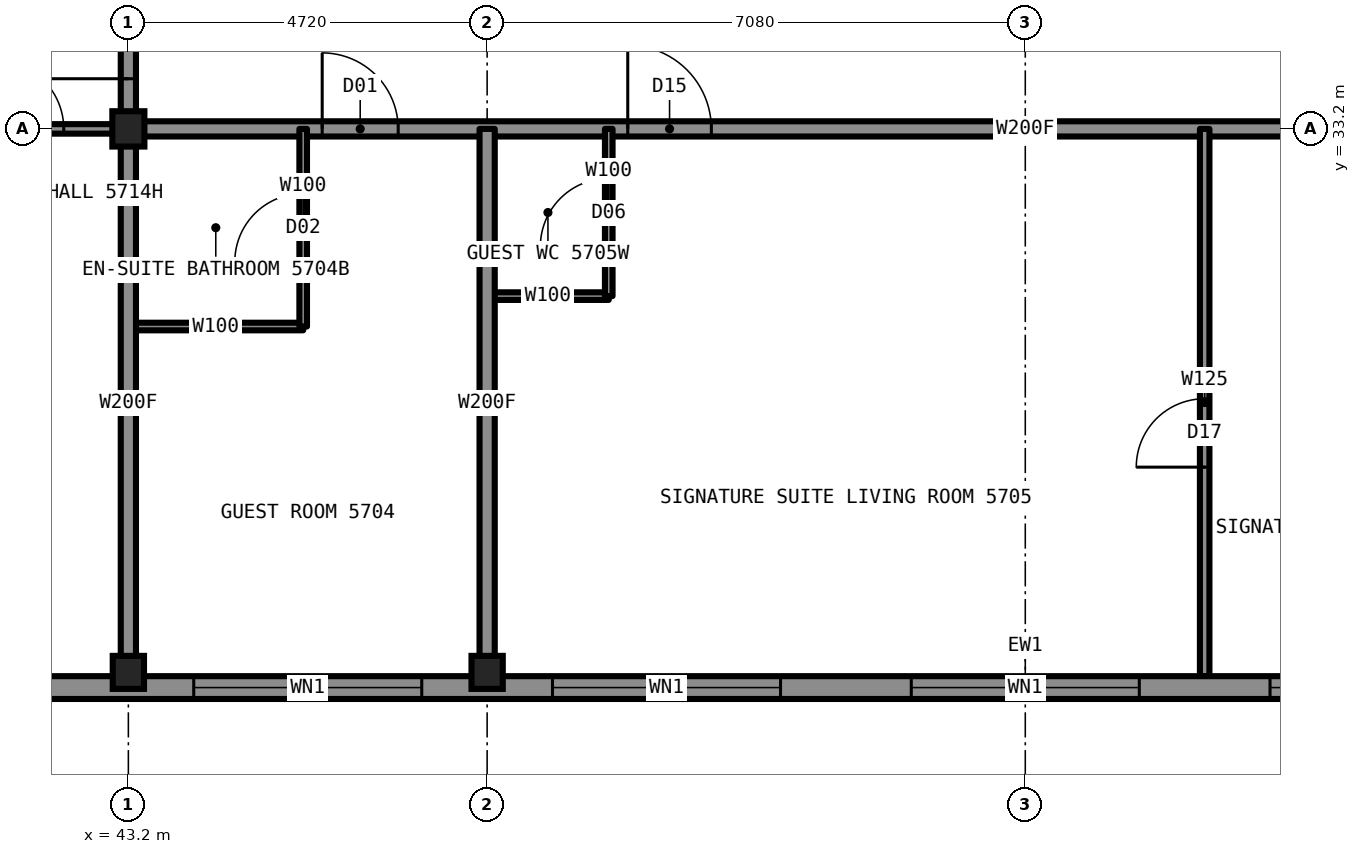
"""IFC4 building model, lengths in metres.
Left out: names, types, materials, properties, quantities, classifications, styles, units other than length and angle.
Written with IfcOpenShell. Run it as: python <this file> out.ifc"""

import sys

from ifc_helpers import new_model, si_unit, direction, frame, frame_2d, origin, origin_2d, place, context, subcontext, project, spatial, rectangle, i_section, extrude, element, fill, save


model = new_model("IFC4")
c1 = context("Model", 3, precision=1e-05, world=origin(), true_north=direction((0.0, 1.0)))
c2 = subcontext(c1, "Body", "Model", "MODEL_VIEW")
j1 = project(units=[si_unit("LENGTHUNIT", "METRE"), si_unit("PLANEANGLEUNIT", "RADIAN")], contexts=[c1])
p1 = place(None, origin())
s1 = spatial("IfcSite", under=j1, at=p1, CompositionType="ELEMENT")
p2 = place(p1, origin())
s2 = spatial("IfcBuilding", under=s1, at=p2, CompositionType="ELEMENT")
p3 = place(p2, frame((0.0, 0.0, 203.8)))
s3 = spatial("IfcBuildingStorey", under=s2, at=p3, CompositionType="ELEMENT", Elevation=203.8)
for number, where, z_axis, x_axis in (
    (1, (43.2, 26.05, 0.0), (0.0, 0.0, 1.0), (1.0, 0.0, 0.0)),
    (2, (47.92, 26.05, 0.0), (0.0, 0.0, 1.0), (1.0, 0.0, 0.0)),
):
    element("IfcColumn", number, at=place(p3, frame(where, z_axis=z_axis, x_axis=x_axis)), inside=s3, PredefinedType="COLUMN", context=c2, shape_type="SweptSolid", body=[
        extrude(i_section(OverallWidth=0.411, OverallDepth=0.434, WebThickness=0.036, FlangeThickness=0.057, at=origin_2d()), origin(), (0.0, 0.0, 1.0), 3.5),
    ])
p4 = place(p3, frame((43.2, 33.2, 0.0), z_axis=(0.0, 0.0, 1.0), x_axis=(1.0, 0.0, 0.0)))
e3 = element("IfcColumn", 3, at=p4, inside=s3, PredefinedType="COLUMN", context=c2, shape_type="SweptSolid", body=[
    extrude(i_section(OverallWidth=0.422, OverallDepth=0.465, WebThickness=0.045, FlangeThickness=0.073, at=origin_2d()), origin(), (0.0, 0.0, 1.0), 3.5),
])
p5 = place(p3, frame((43.2, 33.2, 0.0), z_axis=(0.0, 0.0, 1.0), x_axis=(1.0, 0.0, 0.0)))
e4 = element("IfcWall", 4, at=p5, inside=s3, PredefinedType="PARTITIONING", context=c2, shape_type="SweptSolid", body=[
    extrude(rectangle(XDim=23.6, YDim=0.2, at=frame_2d((11.8, 0.0))), origin(), (0.0, 0.0, 1.0), 3.33),
])
p6 = place(p5, frame((2.55, 0.0, 0.0)))
e5 = element("IfcOpeningElement", 5, at=p6, cuts=e4, PredefinedType="OPENING", context=c2, shape_type="SweptSolid", body=[
    extrude(rectangle(XDim=1.0, YDim=2.2, at=frame_2d((0.5, 1.1))), frame((0.0, 0.11, 0.0), z_axis=(0.0, -1.0, 0.0), x_axis=(1.0, 0.0, 0.0)), (0.0, 0.0, 1.0), 0.22),
])
p7 = place(p5, frame((6.57, 0.0, 0.0)))
e6 = element("IfcOpeningElement", 6, at=p7, cuts=e4, PredefinedType="OPENING", context=c2, shape_type="SweptSolid", body=[
    extrude(rectangle(XDim=1.1, YDim=2.2, at=frame_2d((0.55, 1.1))), frame((0.0, 0.11, 0.0), z_axis=(0.0, -1.0, 0.0), x_axis=(1.0, 0.0, 0.0)), (0.0, 0.0, 1.0), 0.22),
])
p8 = place(p5, frame((21.14, 0.0, 0.0)))
e7 = element("IfcOpeningElement", 7, at=p8, cuts=e4, PredefinedType="OPENING", context=c2, shape_type="SweptSolid", body=[
    extrude(rectangle(XDim=1.0, YDim=2.2, at=frame_2d((0.5, 1.1))), frame((0.0, 0.11, 0.0), z_axis=(0.0, -1.0, 0.0), x_axis=(1.0, 0.0, 0.0)), (0.0, 0.0, 1.0), 0.22),
])
p9 = place(p3, frame((36.0, 33.2, 0.0), z_axis=(0.0, 0.0, 1.0), x_axis=(1.0, 0.0, 0.0)))
e8 = element("IfcWall", 8, at=p9, inside=s3, PredefinedType="PARTITIONING", context=c2, shape_type="SweptSolid", body=[
    extrude(rectangle(XDim=7.2, YDim=0.125, at=frame_2d((3.6, 0.0))), origin(), (0.0, 0.0, 1.0), 2.573),
])
p10 = place(p9, frame((5.45, 0.0, 0.0)))
e9 = element("IfcOpeningElement", 9, at=p10, cuts=e8, PredefinedType="OPENING", context=c2, shape_type="SweptSolid", body=[
    extrude(rectangle(XDim=0.9, YDim=2.2, at=frame_2d((0.45, 1.1))), frame((0.0, 0.073, 0.0), z_axis=(0.0, -1.0, 0.0), x_axis=(1.0, 0.0, 0.0)), (0.0, 0.0, 1.0), 0.145),
])
p11 = place(p3, frame((47.92, 31.0, 0.0), z_axis=(0.0, 0.0, 1.0), x_axis=(1.0, 0.0, 0.0)))
e10 = element("IfcWall", 10, at=p11, inside=s3, PredefinedType="PARTITIONING", context=c2, shape_type="SweptSolid", body=[
    extrude(rectangle(XDim=1.6, YDim=0.1, at=frame_2d((0.8, 0.0))), origin(), (0.0, 0.0, 1.0), 3.33),
])
p12 = place(p3, frame((43.2, 30.6, 0.0), z_axis=(0.0, 0.0, 1.0), x_axis=(1.0, 0.0, 0.0)))
e11 = element("IfcWall", 11, at=p12, inside=s3, PredefinedType="PARTITIONING", context=c2, shape_type="SweptSolid", body=[
    extrude(rectangle(XDim=2.3, YDim=0.1, at=frame_2d((1.15, 0.0))), origin(), (0.0, 0.0, 1.0), 3.33),
])
p13 = place(p3, frame((43.2, 33.2, 0.0), z_axis=(0.0, 0.0, 1.0), x_axis=(0.0, 1.0, 0.0)))
e12 = element("IfcWall", 12, at=p13, inside=s3, PredefinedType="PARTITIONING", context=c2, shape_type="SweptSolid", body=[
    extrude(rectangle(XDim=23.58, YDim=0.2, at=frame_2d((11.79, 0.0))), origin(), (0.0, 0.0, 1.0), 3.33),
])
p14 = place(p13, frame((7.72, 0.0, 0.0)))
e13 = element("IfcOpeningElement", 13, at=p14, cuts=e12, PredefinedType="OPENING", context=c2, shape_type="SweptSolid", body=[
    extrude(rectangle(XDim=1.0, YDim=2.2, at=frame_2d((0.5, 1.1))), frame((0.0, 0.11, 0.0), z_axis=(0.0, -1.0, 0.0), x_axis=(1.0, 0.0, 0.0)), (0.0, 0.0, 1.0), 0.22),
])
p15 = place(p13, frame((17.31, 0.0, 0.0)))
e14 = element("IfcOpeningElement", 14, at=p15, cuts=e12, PredefinedType="OPENING", context=c2, shape_type="SweptSolid", body=[
    extrude(rectangle(XDim=1.0, YDim=2.2, at=frame_2d((0.5, 1.1))), frame((0.0, 0.11, 0.0), z_axis=(0.0, -1.0, 0.0), x_axis=(1.0, 0.0, 0.0)), (0.0, 0.0, 1.0), 0.22),
])
p16 = place(p13, frame((22.05, 0.0, 0.0)))
e15 = element("IfcOpeningElement", 15, at=p16, cuts=e12, PredefinedType="OPENING", context=c2, shape_type="SweptSolid", body=[
    extrude(rectangle(XDim=1.1, YDim=2.2, at=frame_2d((0.55, 1.1))), frame((0.0, 0.11, 0.0), z_axis=(0.0, -1.0, 0.0), x_axis=(1.0, 0.0, 0.0)), (0.0, 0.0, 1.0), 0.22),
])
p17 = place(p13, frame((0.66, 0.0, 0.0)))
e16 = element("IfcOpeningElement", 16, at=p17, cuts=e12, PredefinedType="OPENING", context=c2, shape_type="SweptSolid", body=[
    extrude(rectangle(XDim=1.1, YDim=2.2, at=frame_2d((0.55, 1.1))), frame((0.0, 0.11, 0.0), z_axis=(0.0, -1.0, 0.0), x_axis=(1.0, 0.0, 0.0)), (0.0, 0.0, 1.0), 0.22),
])
p18 = place(p3, frame((43.2, 26.0, 0.0), z_axis=(0.0, 0.0, 1.0), x_axis=(0.0, 1.0, 0.0)))
e17 = element("IfcWall", 17, at=p18, inside=s3, PredefinedType="PARTITIONING", context=c2, shape_type="SweptSolid", body=[
    extrude(rectangle(XDim=7.2, YDim=0.2, at=frame_2d((3.6, 0.0))), origin(), (0.0, 0.0, 1.0), 2.573),
])
p19 = place(p3, frame((49.52, 31.0, 0.0), z_axis=(0.0, 0.0, 1.0), x_axis=(0.0, 1.0, 0.0)))
e18 = element("IfcWall", 18, at=p19, inside=s3, PredefinedType="PARTITIONING", context=c2, shape_type="SweptSolid", body=[
    extrude(rectangle(XDim=2.2, YDim=0.1, at=frame_2d((1.1, 0.0))), origin(), (0.0, 0.0, 1.0), 3.33),
])
p20 = place(p19, frame((0.65, 0.0, 0.0)))
e19 = element("IfcOpeningElement", 19, at=p20, cuts=e18, PredefinedType="OPENING", context=c2, shape_type="SweptSolid", body=[
    extrude(rectangle(XDim=0.9, YDim=2.1, at=frame_2d((0.45, 1.05))), frame((0.0, 0.06, 0.0), z_axis=(0.0, -1.0, 0.0), x_axis=(1.0, 0.0, 0.0)), (0.0, 0.0, 1.0), 0.12),
])
p21 = place(p3, frame((47.92, 26.0, 0.0), z_axis=(0.0, 0.0, 1.0), x_axis=(0.0, 1.0, 0.0)))
e20 = element("IfcWall", 20, at=p21, inside=s3, PredefinedType="PARTITIONING", context=c2, shape_type="SweptSolid", body=[
    extrude(rectangle(XDim=7.2, YDim=0.2, at=frame_2d((3.6, 0.0))), origin(), (0.0, 0.0, 1.0), 2.573),
])
p22 = place(p3, frame((45.5, 30.6, 0.0), z_axis=(0.0, 0.0, 1.0), x_axis=(0.0, 1.0, 0.0)))
e21 = element("IfcWall", 21, at=p22, inside=s3, PredefinedType="PARTITIONING", context=c2, shape_type="SweptSolid", body=[
    extrude(rectangle(XDim=2.6, YDim=0.1, at=frame_2d((1.3, 0.0))), origin(), (0.0, 0.0, 1.0), 3.33),
])
p23 = place(p22, frame((0.85, 0.0, 0.0)))
e22 = element("IfcOpeningElement", 22, at=p23, cuts=e21, PredefinedType="OPENING", context=c2, shape_type="SweptSolid", body=[
    extrude(rectangle(XDim=0.9, YDim=2.1, at=frame_2d((0.45, 1.05))), frame((0.0, 0.06, 0.0), z_axis=(0.0, -1.0, 0.0), x_axis=(1.0, 0.0, 0.0)), (0.0, 0.0, 1.0), 0.12),
])
p24 = place(p3, frame((57.36, 26.0, 0.0), z_axis=(0.0, 0.0, 1.0), x_axis=(0.0, 1.0, 0.0)))
e23 = element("IfcWall", 23, at=p24, inside=s3, PredefinedType="PARTITIONING", context=c2, shape_type="SweptSolid", body=[
    extrude(rectangle(XDim=7.2, YDim=0.125, at=frame_2d((3.6, 0.0))), origin(), (0.0, 0.0, 1.0), 3.33),
])
p25 = place(p24, frame((2.75, 0.0, 0.0)))
e24 = element("IfcOpeningElement", 24, at=p25, cuts=e23, PredefinedType="OPENING", context=c2, shape_type="SweptSolid", body=[
    extrude(rectangle(XDim=0.9, YDim=2.2, at=frame_2d((0.45, 1.1))), frame((0.0, 0.073, 0.0), z_axis=(0.0, -1.0, 0.0), x_axis=(1.0, 0.0, 0.0)), (0.0, 0.0, 1.0), 0.145),
])
p26 = place(p3, frame((41.2, 25.85, 0.0), z_axis=(0.0, 0.0, 1.0), x_axis=(1.0, 0.0, 0.0)))
e25 = element("IfcWall", 25, at=p26, inside=s3, PredefinedType="SOLIDWALL", context=c2, shape_type="SweptSolid", body=[
    extrude(rectangle(XDim=27.6, YDim=0.3, at=frame_2d((13.8, 0.0))), origin(), (0.0, 0.0, 1.0), 2.83),
])
p27 = place(p26, frame((2.86, 0.0, 0.3)))
e26 = element("IfcOpeningElement", 26, at=p27, cuts=e25, PredefinedType="OPENING", context=c2, shape_type="SweptSolid", body=[
    extrude(rectangle(XDim=0.7, YDim=1.2, at=frame_2d((0.35, 0.6))), frame((0.0, 0.16, 0.0), z_axis=(0.0, -1.0, 0.0), x_axis=(1.0, 0.0, 0.0)), (0.0, 0.0, 1.0), 0.32),
])
p28 = place(p26, frame((7.58, 0.0, 0.3)))
e27 = element("IfcOpeningElement", 27, at=p28, cuts=e25, PredefinedType="OPENING", context=c2, shape_type="SweptSolid", body=[
    extrude(rectangle(XDim=3.0, YDim=2.0, at=frame_2d((1.5, 1.0))), frame((0.0, 0.16, 0.0), z_axis=(0.0, -1.0, 0.0), x_axis=(1.0, 0.0, 0.0)), (0.0, 0.0, 1.0), 0.32),
])
p29 = place(p26, frame((12.3, 0.0, 0.3)))
e28 = element("IfcOpeningElement", 28, at=p29, cuts=e25, PredefinedType="OPENING", context=c2, shape_type="SweptSolid", body=[
    extrude(rectangle(XDim=3.0, YDim=2.0, at=frame_2d((1.5, 1.0))), frame((0.0, 0.16, 0.0), z_axis=(0.0, -1.0, 0.0), x_axis=(1.0, 0.0, 0.0)), (0.0, 0.0, 1.0), 0.32),
])
p30 = place(p26, frame((17.02, 0.0, 0.3)))
e29 = element("IfcOpeningElement", 29, at=p30, cuts=e25, PredefinedType="OPENING", context=c2, shape_type="SweptSolid", body=[
    extrude(rectangle(XDim=3.0, YDim=2.0, at=frame_2d((1.5, 1.0))), frame((0.0, 0.16, 0.0), z_axis=(0.0, -1.0, 0.0), x_axis=(1.0, 0.0, 0.0)), (0.0, 0.0, 1.0), 0.32),
])
p31 = place(p26, frame((23.99, 0.0, 0.3)))
e30 = element("IfcOpeningElement", 30, at=p31, cuts=e25, PredefinedType="OPENING", context=c2, shape_type="SweptSolid", body=[
    extrude(rectangle(XDim=0.7, YDim=1.2, at=frame_2d((0.35, 0.6))), frame((0.0, 0.16, 0.0), z_axis=(0.0, -1.0, 0.0), x_axis=(1.0, 0.0, 0.0)), (0.0, 0.0, 1.0), 0.32),
])
p32 = place(p6, origin())
e31 = element("IfcDoor", 31, at=p32, inside=s3, OperationType="SINGLE_SWING_LEFT", PredefinedType="DOOR", context=c2, shape_type="SweptSolid", body=[
    extrude(rectangle(XDim=1.0, YDim=2.2, at=frame_2d((0.5, 1.1))), frame((0.0, 0.025, 0.0), z_axis=(0.0, -1.0, 0.0), x_axis=(1.0, 0.0, 0.0)), (0.0, 0.0, 1.0), 0.05),
])
fill(e5, e31)
p33 = place(p23, origin())
e32 = element("IfcDoor", 32, at=p33, inside=s3, OperationType="SINGLE_SWING_RIGHT", PredefinedType="DOOR", context=c2, shape_type="SweptSolid", body=[
    extrude(rectangle(XDim=0.9, YDim=2.1, at=frame_2d((0.45, 1.05))), frame((0.0, 0.025, 0.0), z_axis=(0.0, -1.0, 0.0), x_axis=(1.0, 0.0, 0.0)), (0.0, 0.0, 1.0), 0.05),
])
fill(e22, e32)
p34 = place(p7, origin())
e33 = element("IfcDoor", 33, at=p34, inside=s3, OperationType="SINGLE_SWING_LEFT", PredefinedType="DOOR", context=c2, shape_type="SweptSolid", body=[
    extrude(rectangle(XDim=1.1, YDim=2.2, at=frame_2d((0.55, 1.1))), frame((0.0, 0.025, 0.0), z_axis=(0.0, -1.0, 0.0), x_axis=(1.0, 0.0, 0.0)), (0.0, 0.0, 1.0), 0.05),
])
fill(e6, e33)
p35 = place(p25, origin())
e34 = element("IfcDoor", 34, at=p35, inside=s3, OperationType="SINGLE_SWING_LEFT", PredefinedType="DOOR", context=c2, shape_type="SweptSolid", body=[
    extrude(rectangle(XDim=0.9, YDim=2.2, at=frame_2d((0.45, 1.1))), frame((0.0, 0.025, 0.0), z_axis=(0.0, -1.0, 0.0), x_axis=(1.0, 0.0, 0.0)), (0.0, 0.0, 1.0), 0.05),
])
fill(e24, e34)
p36 = place(p20, origin())
e35 = element("IfcDoor", 35, at=p36, inside=s3, OperationType="SINGLE_SWING_LEFT", PredefinedType="DOOR", context=c2, shape_type="SweptSolid", body=[
    extrude(rectangle(XDim=0.9, YDim=2.1, at=frame_2d((0.45, 1.05))), frame((0.0, 0.025, 0.0), z_axis=(0.0, -1.0, 0.0), x_axis=(1.0, 0.0, 0.0)), (0.0, 0.0, 1.0), 0.05),
])
fill(e19, e35)
p37 = place(p10, origin())
e36 = element("IfcDoor", 36, at=p37, inside=s3, OperationType="SINGLE_SWING_LEFT", PredefinedType="DOOR", context=c2, shape_type="SweptSolid", body=[
    extrude(rectangle(XDim=0.9, YDim=2.2, at=frame_2d((0.45, 1.1))), frame((0.0, 0.025, 0.0), z_axis=(0.0, -1.0, 0.0), x_axis=(1.0, 0.0, 0.0)), (0.0, 0.0, 1.0), 0.05),
])
fill(e9, e36)
p38 = place(p17, origin())
e37 = element("IfcDoor", 37, at=p38, inside=s3, OperationType="SINGLE_SWING_LEFT", PredefinedType="DOOR", context=c2, shape_type="SweptSolid", body=[
    extrude(rectangle(XDim=1.1, YDim=2.2, at=frame_2d((0.55, 1.1))), frame((0.0, 0.025, 0.0), z_axis=(0.0, -1.0, 0.0), x_axis=(1.0, 0.0, 0.0)), (0.0, 0.0, 1.0), 0.05),
])
fill(e16, e37)
p39 = place(p27, origin())
e38 = element("IfcWindow", 38, at=p39, inside=s3, PartitioningType="SINGLE_PANEL", PredefinedType="WINDOW", context=c2, shape_type="SweptSolid", body=[
    extrude(rectangle(XDim=0.7, YDim=1.2, at=frame_2d((0.35, 0.6))), frame((0.0, 0.13, 0.0), z_axis=(0.0, -1.0, 0.0), x_axis=(1.0, 0.0, 0.0)), (0.0, 0.0, 1.0), 0.06),
])
fill(e26, e38)
p40 = place(p28, origin())
e39 = element("IfcWindow", 39, at=p40, inside=s3, PartitioningType="SINGLE_PANEL", PredefinedType="WINDOW", context=c2, shape_type="SweptSolid", body=[
    extrude(rectangle(XDim=3.0, YDim=2.0, at=frame_2d((1.5, 1.0))), frame((0.0, 0.13, 0.0), z_axis=(0.0, -1.0, 0.0), x_axis=(1.0, 0.0, 0.0)), (0.0, 0.0, 1.0), 0.06),
])
fill(e27, e39)
p41 = place(p29, origin())
e40 = element("IfcWindow", 40, at=p41, inside=s3, PartitioningType="SINGLE_PANEL", PredefinedType="WINDOW", context=c2, shape_type="SweptSolid", body=[
    extrude(rectangle(XDim=3.0, YDim=2.0, at=frame_2d((1.5, 1.0))), frame((0.0, 0.13, 0.0), z_axis=(0.0, -1.0, 0.0), x_axis=(1.0, 0.0, 0.0)), (0.0, 0.0, 1.0), 0.06),
])
fill(e28, e40)
p42 = place(p30, origin())
e41 = element("IfcWindow", 41, at=p42, inside=s3, PartitioningType="SINGLE_PANEL", PredefinedType="WINDOW", context=c2, shape_type="SweptSolid", body=[
    extrude(rectangle(XDim=3.0, YDim=2.0, at=frame_2d((1.5, 1.0))), frame((0.0, 0.13, 0.0), z_axis=(0.0, -1.0, 0.0), x_axis=(1.0, 0.0, 0.0)), (0.0, 0.0, 1.0), 0.06),
])
fill(e29, e41)
save(model, sys.argv[1])
